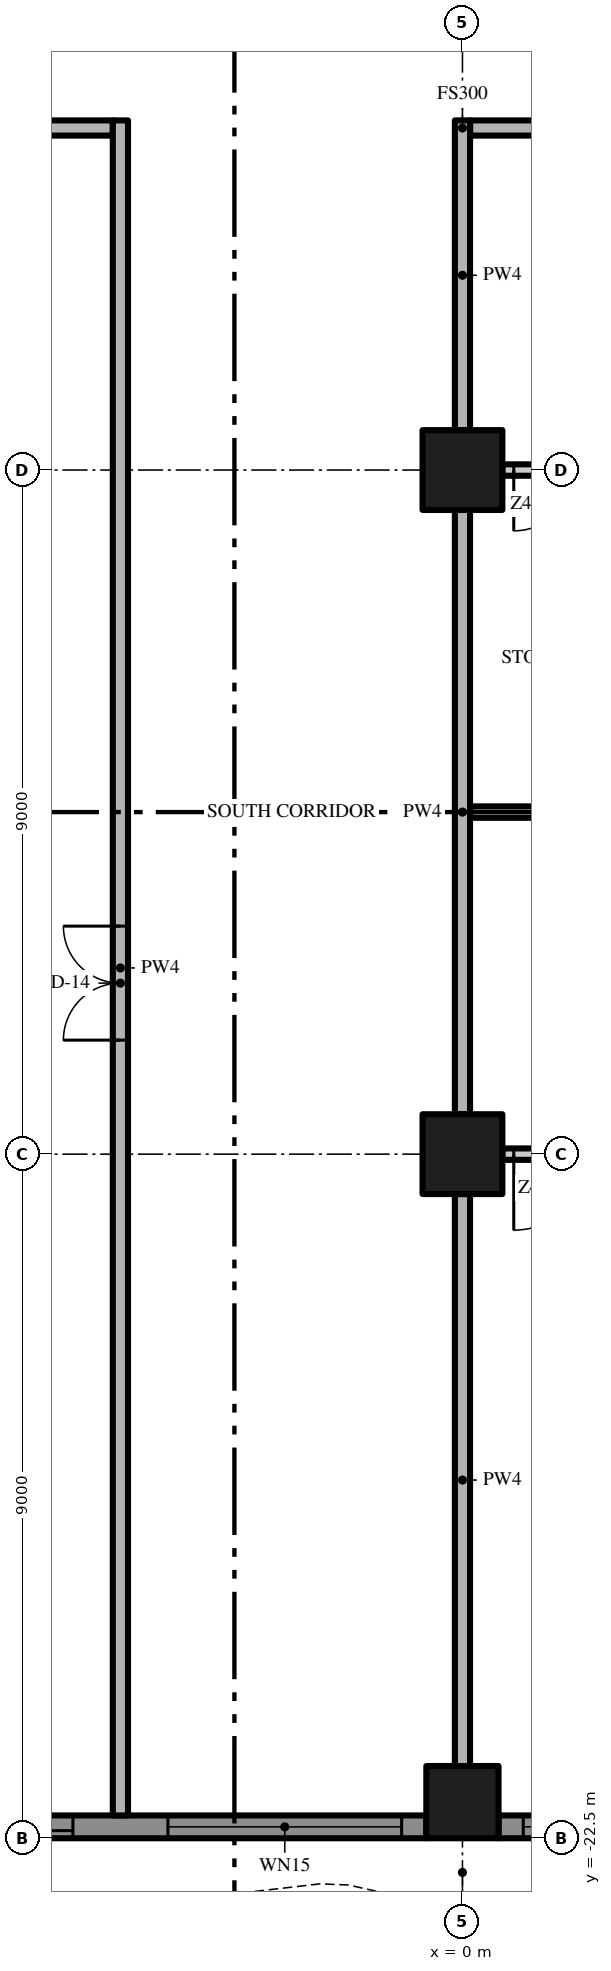
"""IFC4 building model, lengths in metres.
Left out: names, types, materials, properties, quantities, classifications, styles, units other than length and angle.
Written with IfcOpenShell. Run it as: python <this file> out.ifc"""

import sys

from ifc_helpers import new_model, si_unit, direction, frame, frame_2d, origin, origin_2d, place, context, subcontext, project, spatial, polyline, rectangle, outline, extrude, element, fill, save


model = new_model("IFC4")
c1 = context("Model", 3, precision=1e-05, world=origin(), true_north=direction((0.0, 1.0)))
c2 = subcontext(c1, "Body", "Model", "MODEL_VIEW")
j1 = project(units=[si_unit("LENGTHUNIT", "METRE"), si_unit("PLANEANGLEUNIT", "RADIAN")], contexts=[c1])
p1 = place(None, origin())
s1 = spatial("IfcSite", under=j1, at=p1, CompositionType="ELEMENT")
p2 = place(p1, origin())
s2 = spatial("IfcBuilding", under=s1, at=p2, CompositionType="ELEMENT")
p3 = place(p2, frame((0.0, 0.0, 222.4)))
s3 = spatial("IfcBuildingStorey", under=s2, at=p3, CompositionType="ELEMENT", Elevation=222.4)
p4 = place(p3, frame((0.0, -13.5, 0.0), z_axis=(0.0, 0.0, 1.0), x_axis=(1.0, 0.0, 0.0)))
e1 = element("IfcColumn", 1, at=p4, inside=s3, PredefinedType="COLUMN", context=c2, shape_type="SweptSolid", body=[
    extrude(rectangle(XDim=1.05, YDim=1.05, at=origin_2d()), origin(), (0.0, 0.0, 1.0), 3.5),
])
p5 = place(p3, frame((0.0, -22.025, 0.0), z_axis=(0.0, 0.0, 1.0), x_axis=(1.0, 0.0, 0.0)))
e2 = element("IfcColumn", 2, at=p5, inside=s3, PredefinedType="COLUMN", context=c2, shape_type="SweptSolid", body=[
    extrude(rectangle(XDim=0.95, YDim=0.95, at=origin_2d()), origin(), (0.0, 0.0, 1.0), 3.5),
])
p6 = place(p3, frame((0.0, -4.5, 0.0), z_axis=(0.0, 0.0, 1.0), x_axis=(1.0, 0.0, 0.0)))
e3 = element("IfcColumn", 3, at=p6, inside=s3, PredefinedType="COLUMN", context=c2, shape_type="SweptSolid", body=[
    extrude(rectangle(XDim=1.05, YDim=1.05, at=origin_2d()), origin(), (0.0, 0.0, 1.0), 3.5),
])
p7 = place(p3, frame((-0.475, -22.35, 0.0), z_axis=(0.0, 0.0, 1.0), x_axis=(-1.0, 0.0, 0.0)))
e4 = element("IfcWall", 4, at=p7, inside=s3, PredefinedType="SOLIDWALL", context=c2, shape_type="SweptSolid", body=[
    extrude(rectangle(XDim=8.05, YDim=0.3, at=frame_2d((4.025, 0.0))), origin(), (0.0, 0.0, 1.0), 3.5),
])
p8 = place(p7, frame((4.65, 0.0, 0.0)))
e5 = element("IfcOpeningElement", 5, at=p8, cuts=e4, PredefinedType="OPENING", context=c2, shape_type="SweptSolid", body=[
    extrude(rectangle(XDim=3.075, YDim=2.4, at=frame_2d((1.538, 1.2))), frame((0.0, 0.16, 0.0), z_axis=(0.0, -1.0, 0.0), x_axis=(1.0, 0.0, 0.0)), (0.0, 0.0, 1.0), 0.32),
])
p9 = place(p7, frame((0.325, 0.0, 0.45)))
e6 = element("IfcOpeningElement", 6, at=p9, cuts=e4, PredefinedType="OPENING", context=c2, shape_type="SweptSolid", body=[
    extrude(rectangle(XDim=3.075, YDim=2.65, at=frame_2d((1.538, 1.325))), frame((0.0, 0.16, 0.0), z_axis=(0.0, -1.0, 0.0), x_axis=(1.0, 0.0, 0.0)), (0.0, 0.0, 1.0), 0.32),
])
p10 = place(p3, frame((8.525, -22.35, 0.0), z_axis=(0.0, 0.0, 1.0), x_axis=(-1.0, 0.0, 0.0)))
e7 = element("IfcWall", 7, at=p10, inside=s3, PredefinedType="SOLIDWALL", context=c2, shape_type="SweptSolid", body=[
    extrude(rectangle(XDim=8.05, YDim=0.3, at=frame_2d((4.025, 0.0))), origin(), (0.0, 0.0, 1.0), 3.5),
])
p11 = place(p10, frame((4.65, 0.0, 0.45)))
e8 = element("IfcOpeningElement", 8, at=p11, cuts=e7, PredefinedType="OPENING", context=c2, shape_type="SweptSolid", body=[
    extrude(rectangle(XDim=3.075, YDim=2.65, at=frame_2d((1.538, 1.325))), frame((0.0, 0.16, 0.0), z_axis=(0.0, -1.0, 0.0), x_axis=(1.0, 0.0, 0.0)), (0.0, 0.0, 1.0), 0.32),
])
p12 = place(p10, frame((0.325, 0.0, 0.0)))
e9 = element("IfcOpeningElement", 9, at=p12, cuts=e7, PredefinedType="OPENING", context=c2, shape_type="SweptSolid", body=[
    extrude(rectangle(XDim=3.075, YDim=2.4, at=frame_2d((1.538, 1.2))), frame((0.0, 0.16, 0.0), z_axis=(0.0, -1.0, 0.0), x_axis=(1.0, 0.0, 0.0)), (0.0, 0.0, 1.0), 0.32),
])
p13 = place(p3, origin())
e10 = element("IfcWall", 10, at=p13, inside=s3, PredefinedType="USERDEFINED", context=c2, shape_type="SweptSolid", body=[
    extrude(outline(polyline([(-22.5, -25.149), (-21.0, -24.488), (-19.5, -23.755), (-18.0, -23.231), (-16.875, -23.1), (-16.5, -23.115), (-15.0, -23.451), (-13.5, -24.112), (-12.0, -24.845), (-10.5, -25.369), (-9.375, -25.5), (-9.0, -25.485), (-7.5, -25.149), (-6.0, -24.488), (-4.5, -23.755), (-3.0, -23.231), (-1.875, -23.1), (-1.5, -23.115), (0.0, -23.451), (1.5, -24.112), (3.0, -24.845), (4.5, -25.369), (5.625, -25.5), (6.0, -25.485), (7.5, -25.149), (9.0, -24.488), (10.5, -23.755), (12.0, -23.231), (13.125, -23.1), (13.5, -23.115), (15.0, -23.451), (16.5, -24.112), (18.0, -24.845), (19.5, -25.369), (20.625, -25.5), (21.0, -25.485), (22.5, -25.149), (22.445, -24.905), (20.967, -25.236), (20.635, -25.249), (19.556, -25.124), (18.096, -24.614), (16.605, -23.885), (15.079, -23.213), (13.533, -22.866), (13.115, -22.849), (11.944, -22.986), (10.404, -23.524), (8.895, -24.261), (7.421, -24.91), (5.967, -25.236), (5.635, -25.249), (4.556, -25.124), (3.096, -24.614), (1.605, -23.885), (0.079, -23.213), (-1.467, -22.866), (-1.885, -22.849), (-3.056, -22.986), (-4.596, -23.524), (-6.105, -24.261), (-7.579, -24.91), (-9.033, -25.236), (-9.365, -25.249), (-10.444, -25.124), (-11.904, -24.614), (-13.395, -23.885), (-14.921, -23.213), (-16.467, -22.866), (-16.885, -22.849), (-18.056, -22.986), (-19.596, -23.524), (-21.105, -24.261), (-22.601, -24.92), (-22.5, -25.149)])), origin(), (0.0, 0.0, 1.0), 0.9),
])
p14 = place(p3, frame((8.475, -13.5, 0.0), z_axis=(0.0, 0.0, 1.0), x_axis=(-1.0, 0.0, 0.0)))
e11 = element("IfcWall", 11, at=p14, inside=s3, PredefinedType="PARTITIONING", context=c2, shape_type="SweptSolid", body=[
    extrude(rectangle(XDim=7.95, YDim=0.15, at=frame_2d((3.975, 0.0))), origin(), (0.0, 0.0, 1.0), 3.5),
])
p15 = place(p14, frame((6.8, 0.0, 0.0)))
e12 = element("IfcOpeningElement", 12, at=p15, cuts=e11, PredefinedType="OPENING", context=c2, shape_type="SweptSolid", body=[
    extrude(rectangle(XDim=1.0, YDim=2.4, at=frame_2d((0.5, 1.2))), frame((0.0, 0.085, 0.0), z_axis=(0.0, -1.0, 0.0), x_axis=(1.0, 0.0, 0.0)), (0.0, 0.0, 1.0), 0.17),
])
p16 = place(p14, frame((0.15, 0.0, 0.0)))
e13 = element("IfcOpeningElement", 13, at=p16, cuts=e11, PredefinedType="OPENING", context=c2, shape_type="SweptSolid", body=[
    extrude(rectangle(XDim=1.0, YDim=2.4, at=frame_2d((0.5, 1.2))), frame((0.0, 0.085, 0.0), z_axis=(0.0, -1.0, 0.0), x_axis=(1.0, 0.0, 0.0)), (0.0, 0.0, 1.0), 0.17),
])
p17 = place(p3, frame((0.1, -9.0, 0.0), z_axis=(0.0, 0.0, 1.0), x_axis=(1.0, 0.0, 0.0)))
e14 = element("IfcWall", 14, at=p17, inside=s3, PredefinedType="PARTITIONING", context=c2, shape_type="SweptSolid", body=[
    extrude(rectangle(XDim=13.4, YDim=0.15, at=frame_2d((6.7, 0.0))), origin(), (0.0, 0.0, 1.0), 3.5),
])
p18 = place(p17, frame((6.9, 0.0, 0.0)))
e15 = element("IfcOpeningElement", 15, at=p18, cuts=e14, PredefinedType="OPENING", context=c2, shape_type="SweptSolid", body=[
    extrude(rectangle(XDim=1.0, YDim=2.4, at=frame_2d((0.5, 1.2))), frame((0.0, 0.085, 0.0), z_axis=(0.0, -1.0, 0.0), x_axis=(1.0, 0.0, 0.0)), (0.0, 0.0, 1.0), 0.17),
])
p19 = place(p3, frame((8.475, -4.5, 0.0), z_axis=(0.0, 0.0, 1.0), x_axis=(-1.0, 0.0, 0.0)))
e16 = element("IfcWall", 16, at=p19, inside=s3, PredefinedType="PARTITIONING", context=c2, shape_type="SweptSolid", body=[
    extrude(rectangle(XDim=7.95, YDim=0.15, at=frame_2d((3.975, 0.0))), origin(), (0.0, 0.0, 1.0), 3.5),
])
p20 = place(p19, frame((7.0, 0.0, 0.0)))
e17 = element("IfcOpeningElement", 17, at=p20, cuts=e16, PredefinedType="OPENING", context=c2, shape_type="SweptSolid", body=[
    extrude(rectangle(XDim=0.8, YDim=2.0, at=frame_2d((0.4, 1.0))), frame((0.0, 0.085, 0.0), z_axis=(0.0, -1.0, 0.0), x_axis=(1.0, 0.0, 0.0)), (0.0, 0.0, 1.0), 0.17),
])
p21 = place(p19, frame((4.925, 0.0, 0.0)))
e18 = element("IfcOpeningElement", 18, at=p21, cuts=e16, PredefinedType="OPENING", context=c2, shape_type="SweptSolid", body=[
    extrude(rectangle(XDim=0.8, YDim=2.0, at=frame_2d((0.4, 1.0))), frame((0.0, 0.085, 0.0), z_axis=(0.0, -1.0, 0.0), x_axis=(1.0, 0.0, 0.0)), (0.0, 0.0, 1.0), 0.17),
])
p22 = place(p3, frame((-17.4, 0.0, 0.0), z_axis=(0.0, 0.0, 1.0), x_axis=(1.0, 0.0, 0.0)))
e19 = element("IfcWall", 19, at=p22, inside=s3, PredefinedType="PARTITIONING", context=c2, shape_type="SweptSolid", body=[
    extrude(rectangle(XDim=12.8, YDim=0.2, at=frame_2d((6.4, 0.0))), origin(), (0.0, 0.0, 1.0), 3.5),
])
p23 = place(p3, frame((17.4, 0.0, 0.0), z_axis=(0.0, 0.0, 1.0), x_axis=(-1.0, 0.0, 0.0)))
e20 = element("IfcWall", 20, at=p23, inside=s3, PredefinedType="PARTITIONING", context=c2, shape_type="SweptSolid", body=[
    extrude(rectangle(XDim=17.3, YDim=0.2, at=frame_2d((8.65, 0.0))), origin(), (0.0, 0.0, 1.0), 3.5),
])
p24 = place(p23, frame((7.65, 0.0, 0.0)))
e21 = element("IfcOpeningElement", 21, at=p24, cuts=e20, PredefinedType="OPENING", context=c2, shape_type="SweptSolid", body=[
    extrude(rectangle(XDim=1.5, YDim=2.4, at=frame_2d((0.75, 1.2))), frame((0.0, 0.11, 0.0), z_axis=(0.0, -1.0, 0.0), x_axis=(1.0, 0.0, 0.0)), (0.0, 0.0, 1.0), 0.22),
])
p25 = place(p3, frame((-4.5, -22.2, 0.0), z_axis=(0.0, 0.0, 1.0), x_axis=(0.0, 1.0, 0.0)))
e22 = element("IfcWall", 22, at=p25, inside=s3, PredefinedType="PARTITIONING", context=c2, shape_type="SweptSolid", body=[
    extrude(rectangle(XDim=22.3, YDim=0.2, at=frame_2d((11.15, 0.0))), origin(), (0.0, 0.0, 1.0), 3.5),
])
p26 = place(p25, frame((10.2, 0.0, 0.0)))
e23 = element("IfcOpeningElement", 23, at=p26, cuts=e22, PredefinedType="OPENING", context=c2, shape_type="SweptSolid", body=[
    extrude(rectangle(XDim=1.5, YDim=2.4, at=frame_2d((0.75, 1.2))), frame((0.0, 0.11, 0.0), z_axis=(0.0, -1.0, 0.0), x_axis=(1.0, 0.0, 0.0)), (0.0, 0.0, 1.0), 0.22),
])
p27 = place(p3, frame((0.0, -21.55, 0.0), z_axis=(0.0, 0.0, 1.0), x_axis=(0.0, 1.0, 0.0)))
e24 = element("IfcWall", 24, at=p27, inside=s3, PredefinedType="PARTITIONING", context=c2, shape_type="SweptSolid", body=[
    extrude(rectangle(XDim=7.525, YDim=0.2, at=frame_2d((3.763, 0.0))), origin(), (0.0, 0.0, 1.0), 3.5),
])
p28 = place(p3, frame((0.0, -12.975, 0.0), z_axis=(0.0, 0.0, 1.0), x_axis=(0.0, 1.0, 0.0)))
e25 = element("IfcWall", 25, at=p28, inside=s3, PredefinedType="PARTITIONING", context=c2, shape_type="SweptSolid", body=[
    extrude(rectangle(XDim=7.95, YDim=0.2, at=frame_2d((3.975, 0.0))), origin(), (0.0, 0.0, 1.0), 3.5),
])
p29 = place(p3, frame((0.0, -3.975, 0.0), z_axis=(0.0, 0.0, 1.0), x_axis=(0.0, 1.0, 0.0)))
e26 = element("IfcWall", 26, at=p29, inside=s3, PredefinedType="PARTITIONING", context=c2, shape_type="SweptSolid", body=[
    extrude(rectangle(XDim=4.075, YDim=0.2, at=frame_2d((2.038, 0.0))), origin(), (0.0, 0.0, 1.0), 3.5),
])
p30 = place(p8, origin())
e27 = element("IfcDoor", 27, at=p30, inside=s3, OperationType="SINGLE_SWING_LEFT", PredefinedType="DOOR", context=c2, shape_type="SweptSolid", body=[
    extrude(rectangle(XDim=3.075, YDim=2.4, at=frame_2d((1.538, 1.2))), frame((0.0, 0.025, 0.0), z_axis=(0.0, -1.0, 0.0), x_axis=(1.0, 0.0, 0.0)), (0.0, 0.0, 1.0), 0.05),
])
fill(e5, e27)
p31 = place(p9, origin())
e28 = element("IfcWindow", 28, at=p31, inside=s3, PartitioningType="SINGLE_PANEL", PredefinedType="WINDOW", context=c2, shape_type="SweptSolid", body=[
    extrude(rectangle(XDim=3.075, YDim=2.65, at=frame_2d((1.538, 1.325))), frame((0.0, 0.03, 0.0), z_axis=(0.0, -1.0, 0.0), x_axis=(1.0, 0.0, 0.0)), (0.0, 0.0, 1.0), 0.06),
])
fill(e6, e28)
p32 = place(p11, origin())
e29 = element("IfcWindow", 29, at=p32, inside=s3, PartitioningType="SINGLE_PANEL", PredefinedType="WINDOW", context=c2, shape_type="SweptSolid", body=[
    extrude(rectangle(XDim=3.075, YDim=2.65, at=frame_2d((1.538, 1.325))), frame((0.0, 0.03, 0.0), z_axis=(0.0, -1.0, 0.0), x_axis=(1.0, 0.0, 0.0)), (0.0, 0.0, 1.0), 0.06),
])
fill(e8, e29)
p33 = place(p26, origin())
e30 = element("IfcDoor", 30, at=p33, inside=s3, OperationType="DOUBLE_DOOR_SINGLE_SWING", PredefinedType="DOOR", context=c2, shape_type="SweptSolid", body=[
    extrude(rectangle(XDim=1.5, YDim=2.4, at=frame_2d((0.75, 1.2))), frame((0.0, 0.025, 0.0), z_axis=(0.0, -1.0, 0.0), x_axis=(1.0, 0.0, 0.0)), (0.0, 0.0, 1.0), 0.05),
])
fill(e23, e30)
p34 = place(p20, origin())
e31 = element("IfcDoor", 31, at=p34, inside=s3, OperationType="SINGLE_SWING_RIGHT", PredefinedType="DOOR", context=c2, shape_type="SweptSolid", body=[
    extrude(rectangle(XDim=0.8, YDim=2.0, at=frame_2d((0.4, 1.0))), frame((0.0, 0.025, 0.0), z_axis=(0.0, -1.0, 0.0), x_axis=(1.0, 0.0, 0.0)), (0.0, 0.0, 1.0), 0.05),
])
fill(e17, e31)
p35 = place(p15, origin())
e32 = element("IfcDoor", 32, at=p35, inside=s3, OperationType="SINGLE_SWING_RIGHT", PredefinedType="DOOR", context=c2, shape_type="SweptSolid", body=[
    extrude(rectangle(XDim=1.0, YDim=2.4, at=frame_2d((0.5, 1.2))), frame((0.0, 0.025, 0.0), z_axis=(0.0, -1.0, 0.0), x_axis=(1.0, 0.0, 0.0)), (0.0, 0.0, 1.0), 0.05),
])
fill(e12, e32)
save(model, sys.argv[1])
